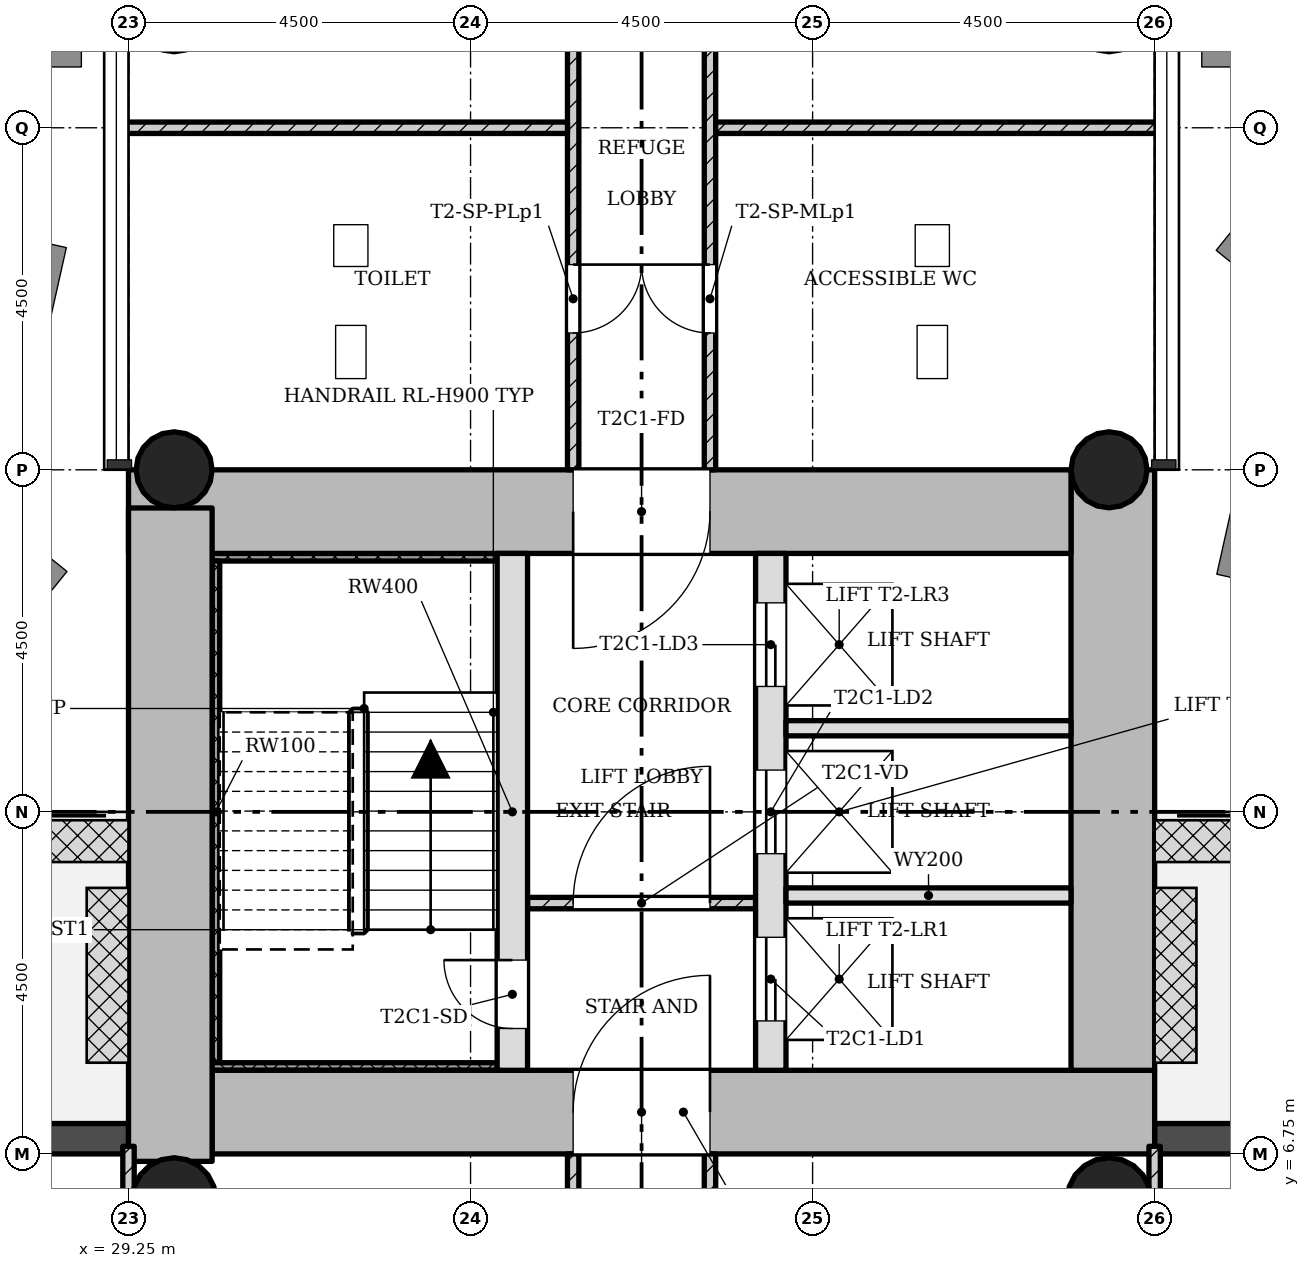
"""IFC4 building model, lengths in metres.
Left out: names, types, materials, properties, quantities, classifications, styles, units other than length and angle.
Written with IfcOpenShell. Run it as: python <this file> out.ifc"""

import sys

from ifc_helpers import new_model, si_unit, direction, frame, frame_2d, origin, origin_2d, place, context, subcontext, project, spatial, rectangle, hollow_circle, extrude, element, fill, save


model = new_model("IFC4")
c1 = context("Model", 3, precision=1e-05, world=origin(), true_north=direction((0.0, 1.0)))
c2 = subcontext(c1, "Body", "Model", "MODEL_VIEW")
j1 = project(units=[si_unit("LENGTHUNIT", "METRE"), si_unit("PLANEANGLEUNIT", "RADIAN")], contexts=[c1])
p1 = place(None, origin())
s1 = spatial("IfcSite", under=j1, at=p1, CompositionType="ELEMENT")
p2 = place(p1, origin())
s2 = spatial("IfcBuilding", under=s1, at=p2, CompositionType="ELEMENT")
p3 = place(p2, frame((0.0, 0.0, 72.1)))
s3 = spatial("IfcBuildingStorey", under=s2, at=p3, CompositionType="ELEMENT", Elevation=72.1)
p4 = place(p3, frame((30.35, 7.3, 0.0), z_axis=(0.0, 0.0, 1.0), x_axis=(1.0, 0.0, 0.0)))
e1 = element("IfcWall", 1, at=p4, inside=s3, PredefinedType="SHEAR", context=c2, shape_type="SweptSolid", body=[
    extrude(rectangle(XDim=12.4, YDim=1.1, at=frame_2d((6.2, 0.0))), origin(), (0.0, 0.0, 1.0), 4.5),
])
p5 = place(p4, frame((4.75, 0.0, 0.0)))
e2 = element("IfcOpeningElement", 2, at=p5, cuts=e1, PredefinedType="OPENING", context=c2, shape_type="SweptSolid", body=[
    extrude(rectangle(XDim=1.8, YDim=2.1, at=frame_2d((0.9, 1.05))), frame((0.0, 0.56, 0.0), z_axis=(0.0, -1.0, 0.0), x_axis=(1.0, 0.0, 0.0)), (0.0, 0.0, 1.0), 1.12),
])
p6 = place(p3, frame((42.2, 7.85, 0.0), z_axis=(0.0, 0.0, 1.0), x_axis=(0.0, 1.0, 0.0)))
e3 = element("IfcWall", 3, at=p6, inside=s3, PredefinedType="SHEAR", context=c2, shape_type="SweptSolid", body=[
    extrude(rectangle(XDim=7.9, YDim=1.1, at=frame_2d((3.95, 0.0))), origin(), (0.0, 0.0, 1.0), 4.5),
])
p7 = place(p3, frame((41.65, 15.2, 0.0), z_axis=(0.0, 0.0, 1.0), x_axis=(-1.0, 0.0, 0.0)))
e4 = element("IfcWall", 4, at=p7, inside=s3, PredefinedType="SHEAR", context=c2, shape_type="SweptSolid", body=[
    extrude(rectangle(XDim=12.4, YDim=1.1, at=frame_2d((6.2, 0.0))), origin(), (0.0, 0.0, 1.0), 4.5),
])
p8 = place(p7, frame((4.75, 0.0, 0.0)))
e5 = element("IfcOpeningElement", 5, at=p8, cuts=e4, PredefinedType="OPENING", context=c2, shape_type="SweptSolid", body=[
    extrude(rectangle(XDim=1.8, YDim=2.1, at=frame_2d((0.9, 1.05))), frame((0.0, 0.56, 0.0), z_axis=(0.0, -1.0, 0.0), x_axis=(1.0, 0.0, 0.0)), (0.0, 0.0, 1.0), 1.12),
])
p9 = place(p3, frame((29.8, 15.248, 0.0), z_axis=(0.0, 0.0, 1.0), x_axis=(0.0, -1.0, 0.0)))
e6 = element("IfcWall", 6, at=p9, inside=s3, PredefinedType="SHEAR", context=c2, shape_type="SweptSolid", body=[
    extrude(rectangle(XDim=8.596, YDim=1.1, at=frame_2d((4.298, 0.0))), origin(), (0.0, 0.0, 1.0), 4.5),
])
p10 = place(p3, frame((34.3, 7.85, 0.0), z_axis=(0.0, 0.0, 1.0), x_axis=(0.0, 1.0, 0.0)))
e7 = element("IfcWall", 7, at=p10, inside=s3, PredefinedType="SHEAR", context=c2, shape_type="SweptSolid", body=[
    extrude(rectangle(XDim=6.8, YDim=0.4, at=frame_2d((3.4, 0.0))), origin(), (0.0, 0.0, 1.0), 4.5),
])
p11 = place(p10, frame((0.55, 0.0, 0.0)))
e8 = element("IfcOpeningElement", 8, at=p11, cuts=e7, PredefinedType="OPENING", context=c2, shape_type="SweptSolid", body=[
    extrude(rectangle(XDim=0.9, YDim=2.1, at=frame_2d((0.45, 1.05))), frame((0.0, 0.21, 0.0), z_axis=(0.0, -1.0, 0.0), x_axis=(1.0, 0.0, 0.0)), (0.0, 0.0, 1.0), 0.42),
])
p12 = place(p3, frame((37.7, 7.85, 0.0), z_axis=(0.0, 0.0, 1.0), x_axis=(0.0, 1.0, 0.0)))
e9 = element("IfcWall", 9, at=p12, inside=s3, PredefinedType="SHEAR", context=c2, shape_type="SweptSolid", body=[
    extrude(rectangle(XDim=6.8, YDim=0.4, at=frame_2d((3.4, 0.0))), origin(), (0.0, 0.0, 1.0), 4.5),
])
p13 = place(p12, frame((0.65, 0.0, 0.0)))
e10 = element("IfcOpeningElement", 10, at=p13, cuts=e9, PredefinedType="OPENING", context=c2, shape_type="SweptSolid", body=[
    extrude(rectangle(XDim=1.1, YDim=2.1, at=frame_2d((0.55, 1.05))), frame((0.0, 0.21, 0.0), z_axis=(0.0, -1.0, 0.0), x_axis=(1.0, 0.0, 0.0)), (0.0, 0.0, 1.0), 0.42),
])
p14 = place(p12, frame((2.85, 0.0, 0.0)))
e11 = element("IfcOpeningElement", 11, at=p14, cuts=e9, PredefinedType="OPENING", context=c2, shape_type="SweptSolid", body=[
    extrude(rectangle(XDim=1.1, YDim=2.1, at=frame_2d((0.55, 1.05))), frame((0.0, 0.21, 0.0), z_axis=(0.0, -1.0, 0.0), x_axis=(1.0, 0.0, 0.0)), (0.0, 0.0, 1.0), 0.42),
])
p15 = place(p12, frame((5.05, 0.0, 0.0)))
e12 = element("IfcOpeningElement", 12, at=p15, cuts=e9, PredefinedType="OPENING", context=c2, shape_type="SweptSolid", body=[
    extrude(rectangle(XDim=1.1, YDim=2.1, at=frame_2d((0.55, 1.05))), frame((0.0, 0.21, 0.0), z_axis=(0.0, -1.0, 0.0), x_axis=(1.0, 0.0, 0.0)), (0.0, 0.0, 1.0), 0.42),
])
for number, where, z_axis, x_axis in (
    (13, (42.15, 15.75, 0.0), (0.0, 0.0, 1.0), (1.0, 0.0, 0.0)),
    (14, (29.85, 15.75, 0.0), (0.0, 0.0, 1.0), (1.0, 0.0, 0.0)),
):
    element("IfcColumn", number, at=place(p3, frame(where, z_axis=z_axis, x_axis=x_axis)), inside=s3, PredefinedType="COLUMN", context=c2, shape_type="SweptSolid", body=[
        extrude(hollow_circle(Radius=0.5, WallThickness=0.036, at=origin_2d()), origin(), (0.0, 0.0, 1.0), 4.5),
    ])
for number, where, z_axis, x_axis in (
    (15, (42.15, 6.15, 0.0), (0.0, 0.0, 1.0), (1.0, 0.0, 0.0)),
    (16, (29.85, 6.15, 0.0), (0.0, 0.0, 1.0), (1.0, 0.0, 0.0)),
):
    element("IfcColumn", number, at=place(p3, frame(where, z_axis=z_axis, x_axis=x_axis)), inside=s3, PredefinedType="COLUMN", context=c2, shape_type="SweptSolid", body=[
        extrude(hollow_circle(Radius=0.55, WallThickness=0.04, at=origin_2d()), origin(), (0.0, 0.0, 1.0), 4.5),
    ])
p16 = place(p3, frame((47.25, 6.95, -0.02), z_axis=(0.0, 0.0, 1.0), x_axis=(-1.0, 0.0, 0.0)))
e17 = element("IfcWall", 17, at=p16, inside=s3, PredefinedType="STANDARD", context=c2, shape_type="SweptSolid", body=[
    extrude(rectangle(XDim=4.5, YDim=0.4, at=frame_2d((2.25, 0.0))), origin(), (0.0, 0.0, 1.0), 4.22),
])
p17 = place(p16, frame((1.35, 0.0, 0.02)))
e18 = element("IfcOpeningElement", 18, at=p17, cuts=e17, PredefinedType="OPENING", context=c2, shape_type="SweptSolid", body=[
    extrude(rectangle(XDim=1.8, YDim=2.1, at=frame_2d((0.9, 1.05))), frame((0.0, 0.21, 0.0), z_axis=(0.0, -1.0, 0.0), x_axis=(1.0, 0.0, 0.0)), (0.0, 0.0, 1.0), 0.42),
])
p18 = place(p3, frame((29.25, 6.95, -0.02), z_axis=(0.0, 0.0, 1.0), x_axis=(-1.0, 0.0, 0.0)))
e19 = element("IfcWall", 19, at=p18, inside=s3, PredefinedType="STANDARD", context=c2, shape_type="SweptSolid", body=[
    extrude(rectangle(XDim=4.5, YDim=0.4, at=frame_2d((2.25, 0.0))), origin(), (0.0, 0.0, 1.0), 4.22),
])
p19 = place(p18, frame((1.35, 0.0, 0.02)))
e20 = element("IfcOpeningElement", 20, at=p19, cuts=e19, PredefinedType="OPENING", context=c2, shape_type="SweptSolid", body=[
    extrude(rectangle(XDim=1.8, YDim=2.1, at=frame_2d((0.9, 1.05))), frame((0.0, 0.21, 0.0), z_axis=(0.0, -1.0, 0.0), x_axis=(1.0, 0.0, 0.0)), (0.0, 0.0, 1.0), 0.42),
])
p20 = place(p3, frame((37.5, 10.05, 0.0), z_axis=(0.0, 0.0, 1.0), x_axis=(-1.0, 0.0, 0.0)))
e21 = element("IfcWall", 21, at=p20, inside=s3, PredefinedType="PARTITIONING", context=c2, shape_type="SweptSolid", body=[
    extrude(rectangle(XDim=3.0, YDim=0.15, at=frame_2d((1.5, 0.0))), origin(), (0.0, 0.0, 1.0), 4.08),
])
p21 = place(p20, frame((0.6, 0.0, 0.0)))
e22 = element("IfcOpeningElement", 22, at=p21, cuts=e21, PredefinedType="OPENING", context=c2, shape_type="SweptSolid", body=[
    extrude(rectangle(XDim=1.8, YDim=2.1, at=frame_2d((0.9, 1.05))), frame((0.0, 0.085, 0.0), z_axis=(0.0, -1.0, 0.0), x_axis=(1.0, 0.0, 0.0)), (0.0, 0.0, 1.0), 0.17),
])
for number, where, z_axis, x_axis in (
    (23, (41.65, 10.15, 0.0), (0.0, 0.0, 1.0), (-1.0, 0.0, 0.0)),
    (24, (41.65, 12.35, 0.0), (0.0, 0.0, 1.0), (-1.0, 0.0, 0.0)),
):
    element("IfcWall", number, at=place(p3, frame(where, z_axis=z_axis, x_axis=x_axis)), inside=s3, PredefinedType="SOLIDWALL", context=c2, shape_type="SweptSolid", body=[
        extrude(rectangle(XDim=3.75, YDim=0.2, at=frame_2d((1.875, 0.0))), origin(), (0.0, 0.0, 1.0), 4.08),
    ])
p22 = place(p3, frame((35.1, 0.9, 0.0), z_axis=(0.0, 0.0, 1.0), x_axis=(0.0, 1.0, 0.0)))
e25 = element("IfcWall", 25, at=p22, inside=s3, PredefinedType="PARTITIONING", context=c2, shape_type="SweptSolid", body=[
    extrude(rectangle(XDim=5.85, YDim=0.15, at=frame_2d((2.925, 0.0))), origin(), (0.0, 0.0, 1.0), 4.08),
])
p23 = place(p22, frame((2.475, 0.0, 0.0)))
e26 = element("IfcOpeningElement", 26, at=p23, cuts=e25, PredefinedType="OPENING", context=c2, shape_type="SweptSolid", body=[
    extrude(rectangle(XDim=0.9, YDim=2.1, at=frame_2d((0.45, 1.05))), frame((0.0, 0.085, 0.0), z_axis=(0.0, -1.0, 0.0), x_axis=(1.0, 0.0, 0.0)), (0.0, 0.0, 1.0), 0.17),
])
p24 = place(p3, frame((36.9, 0.9, 0.0), z_axis=(0.0, 0.0, 1.0), x_axis=(0.0, 1.0, 0.0)))
e27 = element("IfcWall", 27, at=p24, inside=s3, PredefinedType="PARTITIONING", context=c2, shape_type="SweptSolid", body=[
    extrude(rectangle(XDim=5.85, YDim=0.15, at=frame_2d((2.925, 0.0))), origin(), (0.0, 0.0, 1.0), 4.08),
])
p25 = place(p24, frame((2.475, 0.0, 0.0)))
e28 = element("IfcOpeningElement", 28, at=p25, cuts=e27, PredefinedType="OPENING", context=c2, shape_type="SweptSolid", body=[
    extrude(rectangle(XDim=0.9, YDim=2.1, at=frame_2d((0.45, 1.05))), frame((0.0, 0.085, 0.0), z_axis=(0.0, -1.0, 0.0), x_axis=(1.0, 0.0, 0.0)), (0.0, 0.0, 1.0), 0.17),
])
p26 = place(p3, frame((35.1, 15.75, 0.0), z_axis=(0.0, 0.0, 1.0), x_axis=(0.0, 1.0, 0.0)))
e29 = element("IfcWall", 29, at=p26, inside=s3, PredefinedType="PARTITIONING", context=c2, shape_type="SweptSolid", body=[
    extrude(rectangle(XDim=9.1, YDim=0.15, at=frame_2d((4.55, 0.0))), origin(), (0.0, 0.0, 1.0), 4.08),
])
p27 = place(p26, frame((1.8, 0.0, 0.0)))
e30 = element("IfcOpeningElement", 30, at=p27, cuts=e29, PredefinedType="OPENING", context=c2, shape_type="SweptSolid", body=[
    extrude(rectangle(XDim=0.9, YDim=2.1, at=frame_2d((0.45, 1.05))), frame((0.0, 0.085, 0.0), z_axis=(0.0, -1.0, 0.0), x_axis=(1.0, 0.0, 0.0)), (0.0, 0.0, 1.0), 0.17),
])
p28 = place(p26, frame((6.3, 0.0, 0.0)))
e31 = element("IfcOpeningElement", 31, at=p28, cuts=e29, PredefinedType="OPENING", context=c2, shape_type="SweptSolid", body=[
    extrude(rectangle(XDim=0.9, YDim=2.1, at=frame_2d((0.45, 1.05))), frame((0.0, 0.085, 0.0), z_axis=(0.0, -1.0, 0.0), x_axis=(1.0, 0.0, 0.0)), (0.0, 0.0, 1.0), 0.17),
])
p29 = place(p3, frame((35.025, 20.25, 0.0), z_axis=(0.0, 0.0, 1.0), x_axis=(-1.0, 0.0, 0.0)))
e32 = element("IfcWall", 32, at=p29, inside=s3, PredefinedType="PARTITIONING", context=c2, shape_type="SweptSolid", body=[
    extrude(rectangle(XDim=5.875, YDim=0.15, at=frame_2d((2.938, 0.0))), origin(), (0.0, 0.0, 1.0), 4.08),
])
p30 = place(p3, frame((36.9, 15.75, 0.0), z_axis=(0.0, 0.0, 1.0), x_axis=(0.0, 1.0, 0.0)))
e33 = element("IfcWall", 33, at=p30, inside=s3, PredefinedType="PARTITIONING", context=c2, shape_type="SweptSolid", body=[
    extrude(rectangle(XDim=9.1, YDim=0.15, at=frame_2d((4.55, 0.0))), origin(), (0.0, 0.0, 1.0), 4.08),
])
p31 = place(p30, frame((1.8, 0.0, 0.0)))
e34 = element("IfcOpeningElement", 34, at=p31, cuts=e33, PredefinedType="OPENING", context=c2, shape_type="SweptSolid", body=[
    extrude(rectangle(XDim=0.9, YDim=2.1, at=frame_2d((0.45, 1.05))), frame((0.0, 0.085, 0.0), z_axis=(0.0, -1.0, 0.0), x_axis=(1.0, 0.0, 0.0)), (0.0, 0.0, 1.0), 0.17),
])
p32 = place(p30, frame((6.3, 0.0, 0.0)))
e35 = element("IfcOpeningElement", 35, at=p32, cuts=e33, PredefinedType="OPENING", context=c2, shape_type="SweptSolid", body=[
    extrude(rectangle(XDim=0.9, YDim=2.1, at=frame_2d((0.45, 1.05))), frame((0.0, 0.085, 0.0), z_axis=(0.0, -1.0, 0.0), x_axis=(1.0, 0.0, 0.0)), (0.0, 0.0, 1.0), 0.17),
])
p33 = place(p3, frame((36.975, 20.25, 0.0), z_axis=(0.0, 0.0, 1.0), x_axis=(1.0, 0.0, 0.0)))
e36 = element("IfcWall", 36, at=p33, inside=s3, PredefinedType="PARTITIONING", context=c2, shape_type="SweptSolid", body=[
    extrude(rectangle(XDim=5.875, YDim=0.15, at=frame_2d((2.938, 0.0))), origin(), (0.0, 0.0, 1.0), 4.08),
])
p34 = place(p3, frame((29.25, -6.85, 0.0), z_axis=(0.0, 0.0, 1.0), x_axis=(0.0, 1.0, 0.0)))
e37 = element("IfcWall", 37, at=p34, inside=s3, PredefinedType="PARTITIONING", context=c2, shape_type="SweptSolid", body=[
    extrude(rectangle(XDim=13.7, YDim=0.15, at=frame_2d((6.85, 0.0))), origin(), (0.0, 0.0, 1.0), 4.08),
])
p35 = place(p34, frame((5.95, 0.0, 0.0)))
e38 = element("IfcOpeningElement", 38, at=p35, cuts=e37, PredefinedType="OPENING", context=c2, shape_type="SweptSolid", body=[
    extrude(rectangle(XDim=1.8, YDim=2.1, at=frame_2d((0.9, 1.05))), frame((0.0, 0.085, 0.0), z_axis=(0.0, -1.0, 0.0), x_axis=(1.0, 0.0, 0.0)), (0.0, 0.0, 1.0), 0.17),
])
p36 = place(p3, frame((42.75, -6.85, 0.0), z_axis=(0.0, 0.0, 1.0), x_axis=(0.0, 1.0, 0.0)))
e39 = element("IfcWall", 39, at=p36, inside=s3, PredefinedType="PARTITIONING", context=c2, shape_type="SweptSolid", body=[
    extrude(rectangle(XDim=13.7, YDim=0.15, at=frame_2d((6.85, 0.0))), origin(), (0.0, 0.0, 1.0), 4.08),
])
p37 = place(p36, frame((5.95, 0.0, 0.0)))
e40 = element("IfcOpeningElement", 40, at=p37, cuts=e39, PredefinedType="OPENING", context=c2, shape_type="SweptSolid", body=[
    extrude(rectangle(XDim=1.8, YDim=2.1, at=frame_2d((0.9, 1.05))), frame((0.0, 0.085, 0.0), z_axis=(0.0, -1.0, 0.0), x_axis=(1.0, 0.0, 0.0)), (0.0, 0.0, 1.0), 0.17),
])
p38 = place(p3, frame((34.1, 14.6, 0.0), z_axis=(0.0, 0.0, 1.0), x_axis=(-1.0, 0.0, 0.0)))
e41 = element("IfcWall", 41, at=p38, inside=s3, PredefinedType="SHEAR", context=c2, shape_type="SweptSolid", body=[
    extrude(rectangle(XDim=3.75, YDim=0.1, at=frame_2d((1.875, 0.0))), origin(), (0.0, 0.0, 1.0), 4.5),
])
p39 = place(p3, frame((30.4, 7.95, 0.0), z_axis=(0.0, 0.0, 1.0), x_axis=(0.0, 1.0, 0.0)))
e42 = element("IfcWall", 42, at=p39, inside=s3, PredefinedType="SHEAR", context=c2, shape_type="SweptSolid", body=[
    extrude(rectangle(XDim=6.6, YDim=0.1, at=frame_2d((3.3, 0.0))), origin(), (0.0, 0.0, 1.0), 4.5),
])
p40 = place(p3, frame((34.1, 7.9, 0.0), z_axis=(0.0, 0.0, 1.0), x_axis=(-1.0, 0.0, 0.0)))
e43 = element("IfcWall", 43, at=p40, inside=s3, PredefinedType="SHEAR", context=c2, shape_type="SweptSolid", body=[
    extrude(rectangle(XDim=3.75, YDim=0.1, at=frame_2d((1.875, 0.0))), origin(), (0.0, 0.0, 1.0), 4.5),
])
p41 = place(p21, origin())
e44 = element("IfcDoor", 44, at=p41, inside=s3, OperationType="SINGLE_SWING_LEFT", PredefinedType="DOOR", context=c2, shape_type="SweptSolid", body=[
    extrude(rectangle(XDim=1.8, YDim=2.1, at=frame_2d((0.9, 1.05))), frame((0.0, 0.025, 0.0), z_axis=(0.0, -1.0, 0.0), x_axis=(1.0, 0.0, 0.0)), (0.0, 0.0, 1.0), 0.05),
])
fill(e22, e44)
p42 = place(p27, origin())
e45 = element("IfcDoor", 45, at=p42, inside=s3, OperationType="SINGLE_SWING_RIGHT", PredefinedType="DOOR", context=c2, shape_type="SweptSolid", body=[
    extrude(rectangle(XDim=0.9, YDim=2.1, at=frame_2d((0.45, 1.05))), frame((0.0, 0.025, 0.0), z_axis=(0.0, -1.0, 0.0), x_axis=(1.0, 0.0, 0.0)), (0.0, 0.0, 1.0), 0.05),
])
fill(e30, e45)
p43 = place(p31, origin())
e46 = element("IfcDoor", 46, at=p43, inside=s3, OperationType="SINGLE_SWING_LEFT", PredefinedType="DOOR", context=c2, shape_type="SweptSolid", body=[
    extrude(rectangle(XDim=0.9, YDim=2.1, at=frame_2d((0.45, 1.05))), frame((0.0, 0.025, 0.0), z_axis=(0.0, -1.0, 0.0), x_axis=(1.0, 0.0, 0.0)), (0.0, 0.0, 1.0), 0.05),
])
fill(e34, e46)
p44 = place(p11, origin())
e47 = element("IfcDoor", 47, at=p44, inside=s3, OperationType="SINGLE_SWING_LEFT", PredefinedType="DOOR", context=c2, shape_type="SweptSolid", body=[
    extrude(rectangle(XDim=0.9, YDim=2.1, at=frame_2d((0.45, 1.05))), frame((0.0, 0.025, 0.0), z_axis=(0.0, -1.0, 0.0), x_axis=(1.0, 0.0, 0.0)), (0.0, 0.0, 1.0), 0.05),
])
fill(e8, e47)
p45 = place(p13, origin())
e48 = element("IfcDoor", 48, at=p45, inside=s3, OperationType="SLIDING_TO_LEFT", PredefinedType="DOOR", context=c2, shape_type="SweptSolid", body=[
    extrude(rectangle(XDim=1.1, YDim=2.1, at=frame_2d((0.55, 1.05))), frame((0.0, 0.025, 0.0), z_axis=(0.0, -1.0, 0.0), x_axis=(1.0, 0.0, 0.0)), (0.0, 0.0, 1.0), 0.05),
])
fill(e10, e48)
p46 = place(p14, origin())
e49 = element("IfcDoor", 49, at=p46, inside=s3, OperationType="SLIDING_TO_LEFT", PredefinedType="DOOR", context=c2, shape_type="SweptSolid", body=[
    extrude(rectangle(XDim=1.1, YDim=2.1, at=frame_2d((0.55, 1.05))), frame((0.0, 0.025, 0.0), z_axis=(0.0, -1.0, 0.0), x_axis=(1.0, 0.0, 0.0)), (0.0, 0.0, 1.0), 0.05),
])
fill(e11, e49)
p47 = place(p15, origin())
e50 = element("IfcDoor", 50, at=p47, inside=s3, OperationType="SLIDING_TO_LEFT", PredefinedType="DOOR", context=c2, shape_type="SweptSolid", body=[
    extrude(rectangle(XDim=1.1, YDim=2.1, at=frame_2d((0.55, 1.05))), frame((0.0, 0.025, 0.0), z_axis=(0.0, -1.0, 0.0), x_axis=(1.0, 0.0, 0.0)), (0.0, 0.0, 1.0), 0.05),
])
fill(e12, e50)
p48 = place(p5, origin())
e51 = element("IfcDoor", 51, at=p48, inside=s3, OperationType="SINGLE_SWING_LEFT", PredefinedType="DOOR", context=c2, shape_type="SweptSolid", body=[
    extrude(rectangle(XDim=1.8, YDim=2.1, at=frame_2d((0.9, 1.05))), frame((0.0, 0.025, 0.0), z_axis=(0.0, -1.0, 0.0), x_axis=(1.0, 0.0, 0.0)), (0.0, 0.0, 1.0), 0.05),
])
fill(e2, e51)
p49 = place(p8, origin())
e52 = element("IfcDoor", 52, at=p49, inside=s3, OperationType="SINGLE_SWING_LEFT", PredefinedType="DOOR", context=c2, shape_type="SweptSolid", body=[
    extrude(rectangle(XDim=1.8, YDim=2.1, at=frame_2d((0.9, 1.05))), frame((0.0, 0.025, 0.0), z_axis=(0.0, -1.0, 0.0), x_axis=(1.0, 0.0, 0.0)), (0.0, 0.0, 1.0), 0.05),
])
fill(e5, e52)
save(model, sys.argv[1])
